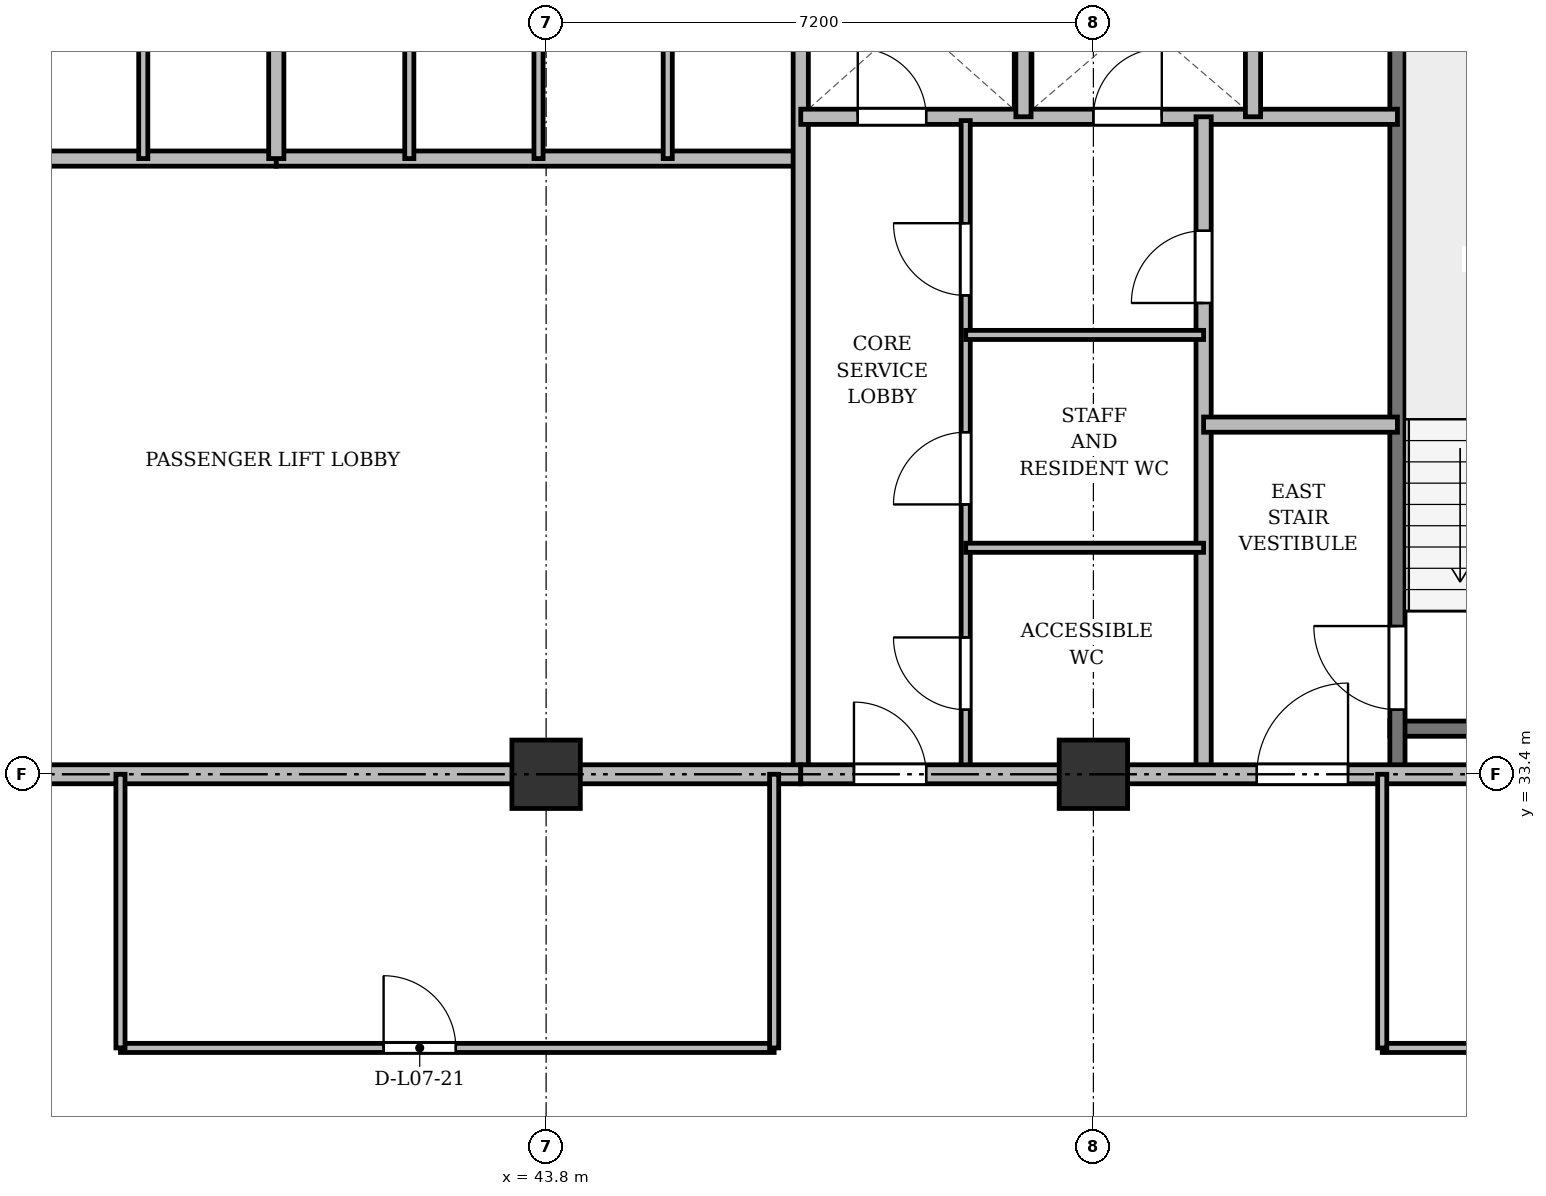
"""IFC4 building model, lengths in metres.
Left out: names, types, materials, properties, quantities, classifications, styles, units other than length and angle.
Written with IfcOpenShell. Run it as: python <this file> out.ifc"""

import sys

from ifc_helpers import new_model, si_unit, direction, frame, frame_2d, origin, origin_2d, place, context, subcontext, project, spatial, rectangle, extrude, source, transform, mapped, element, fill, save


model = new_model("IFC4")
c1 = context("Model", 3, precision=1e-05, world=origin(), true_north=direction((0.0, 1.0)))
c2 = subcontext(c1, "Body", "Model", "MODEL_VIEW")
j1 = project(units=[si_unit("LENGTHUNIT", "METRE"), si_unit("PLANEANGLEUNIT", "RADIAN")], contexts=[c1])
p1 = place(None, origin())
s1 = spatial("IfcSite", under=j1, at=p1, CompositionType="ELEMENT")
p2 = place(p1, origin())
s2 = spatial("IfcBuilding", under=s1, at=p2, CompositionType="ELEMENT")
p3 = place(p2, frame((0.0, 0.0, 30.7)))
s3 = spatial("IfcBuildingStorey", under=s2, at=p3, CompositionType="ELEMENT", Elevation=30.7)
m1 = source(origin(), c2, "Body", "SweptSolid", [
    extrude(rectangle(XDim=0.9, YDim=0.9, at=origin_2d()), origin(), (0.0, 0.0, 1.0), 3.6),
])
for number, where, z_axis, x_axis in (
    (1, (43.8, 33.4, 0.0), (0.0, 0.0, 1.0), (1.0, 0.0, 0.0)),
    (2, (51.0, 33.4, 0.0), (0.0, 0.0, 1.0), (1.0, 0.0, 0.0)),
):
    element("IfcColumn", number, at=place(p3, frame(where, z_axis=z_axis, x_axis=x_axis)), inside=s3, PredefinedType="COLUMN", context=c2, shape_type="MappedRepresentation", body=[
        mapped(m1, transform((0.0, 0.0, 0.0), x_axis=(1.0, 0.0, 0.0), y_axis=(0.0, 1.0, 0.0), z_axis=(0.0, 0.0, 1.0), scale=1.0)),
    ])
p4 = place(p3, frame((54.9, 34.0, 0.0), z_axis=(0.0, 0.0, 1.0), x_axis=(1.0, 0.0, 0.0)))
e3 = element("IfcWall", 3, at=p4, inside=s3, PredefinedType="SHEAR", context=c2, shape_type="SweptSolid", body=[
    extrude(rectangle(XDim=3.4, YDim=0.2, at=frame_2d((1.7, 0.0))), origin(), (0.0, 0.0, 1.0), 3.34),
])
p5 = place(p3, frame((55.0, 33.4, 0.0), z_axis=(0.0, 0.0, 1.0), x_axis=(0.0, 1.0, 0.0)))
e4 = element("IfcWall", 4, at=p5, inside=s3, PredefinedType="SHEAR", context=c2, shape_type="SweptSolid", body=[
    extrude(rectangle(XDim=11.1, YDim=0.2, at=frame_2d((5.55, 0.0))), origin(), (0.0, 0.0, 1.0), 3.34),
])
p6 = place(p5, frame((0.85, 0.0, 0.0)))
e5 = element("IfcOpeningElement", 5, at=p6, cuts=e4, PredefinedType="OPENING", context=c2, shape_type="SweptSolid", body=[
    extrude(rectangle(XDim=1.1, YDim=2.15, at=frame_2d((0.55, 1.075))), frame((0.0, 0.11, 0.0), z_axis=(0.0, -1.0, 0.0), x_axis=(1.0, 0.0, 0.0)), (0.0, 0.0, 1.0), 0.22),
])
p7 = place(p3, frame((33.35, 41.5, 0.0), z_axis=(0.0, 0.0, 1.0), x_axis=(1.0, 0.0, 0.0)))
e6 = element("IfcWall", 6, at=p7, inside=s3, PredefinedType="SOLIDWALL", context=c2, shape_type="SweptSolid", body=[
    extrude(rectangle(XDim=6.9, YDim=0.2, at=frame_2d((3.45, 0.0))), origin(), (0.0, 0.0, 1.0), 3.34),
])
p8 = place(p3, frame((38.5, 41.5, 0.0), z_axis=(0.0, 0.0, 1.0), x_axis=(0.0, 1.0, 0.0)))
e7 = element("IfcWall", 7, at=p8, inside=s3, PredefinedType="PARTITIONING", context=c2, shape_type="SweptSolid", body=[
    extrude(rectangle(XDim=3.2, YDim=0.12, at=frame_2d((1.6, 0.0))), origin(), (0.0, 0.0, 1.0), 3.34),
])
p9 = place(p3, frame((40.25, 41.5, 0.0), z_axis=(0.0, 0.0, 1.0), x_axis=(1.0, 0.0, 0.0)))
e8 = element("IfcWall", 8, at=p9, inside=s3, PredefinedType="SOLIDWALL", context=c2, shape_type="SweptSolid", body=[
    extrude(rectangle(XDim=6.9, YDim=0.2, at=frame_2d((3.45, 0.0))), origin(), (0.0, 0.0, 1.0), 2.752),
])
p10 = place(p3, frame((40.25, 41.5, 0.0), z_axis=(0.0, 0.0, 1.0), x_axis=(0.0, 1.0, 0.0)))
e9 = element("IfcWall", 9, at=p10, inside=s3, PredefinedType="SOLIDWALL", context=c2, shape_type="SweptSolid", body=[
    extrude(rectangle(XDim=3.2, YDim=0.2, at=frame_2d((1.6, 0.0))), origin(), (0.0, 0.0, 1.0), 3.34),
])
p11 = place(p3, frame((42.0, 41.5, 0.0), z_axis=(0.0, 0.0, 1.0), x_axis=(0.0, 1.0, 0.0)))
e10 = element("IfcWall", 10, at=p11, inside=s3, PredefinedType="PARTITIONING", context=c2, shape_type="SweptSolid", body=[
    extrude(rectangle(XDim=3.2, YDim=0.12, at=frame_2d((1.6, 0.0))), origin(), (0.0, 0.0, 1.0), 3.34),
])
p12 = place(p3, frame((43.7, 41.5, 0.0), z_axis=(0.0, 0.0, 1.0), x_axis=(0.0, 1.0, 0.0)))
e11 = element("IfcWall", 11, at=p12, inside=s3, PredefinedType="PARTITIONING", context=c2, shape_type="SweptSolid", body=[
    extrude(rectangle(XDim=3.2, YDim=0.12, at=frame_2d((1.6, 0.0))), origin(), (0.0, 0.0, 1.0), 2.752),
])
p13 = place(p3, frame((45.4, 41.5, 0.0), z_axis=(0.0, 0.0, 1.0), x_axis=(0.0, 1.0, 0.0)))
e12 = element("IfcWall", 12, at=p13, inside=s3, PredefinedType="PARTITIONING", context=c2, shape_type="SweptSolid", body=[
    extrude(rectangle(XDim=3.2, YDim=0.12, at=frame_2d((1.6, 0.0))), origin(), (0.0, 0.0, 1.0), 3.34),
])
p14 = place(p3, frame((47.15, 33.4, 0.0), z_axis=(0.0, 0.0, 1.0), x_axis=(0.0, 1.0, 0.0)))
e13 = element("IfcWall", 13, at=p14, inside=s3, PredefinedType="SOLIDWALL", context=c2, shape_type="SweptSolid", body=[
    extrude(rectangle(XDim=11.3, YDim=0.2, at=frame_2d((5.65, 0.0))), origin(), (0.0, 0.0, 1.0), 2.69),
])
p15 = place(p3, frame((26.3, 33.4, 0.0), z_axis=(0.0, 0.0, 1.0), x_axis=(1.0, 0.0, 0.0)))
e14 = element("IfcWall", 14, at=p15, inside=s3, PredefinedType="PARTITIONING", context=c2, shape_type="SweptSolid", body=[
    extrude(rectangle(XDim=20.85, YDim=0.25, at=frame_2d((10.425, 0.0))), origin(), (0.0, 0.0, 1.0), 2.69),
])
p16 = place(p15, frame((9.2, 0.0, 0.0)))
e15 = element("IfcOpeningElement", 15, at=p16, cuts=e14, PredefinedType="OPENING", context=c2, shape_type="SweptSolid", body=[
    extrude(rectangle(XDim=1.6, YDim=2.2, at=frame_2d((0.8, 1.1))), frame((0.0, 0.135, 0.0), z_axis=(0.0, -1.0, 0.0), x_axis=(1.0, 0.0, 0.0)), (0.0, 0.0, 1.0), 0.27),
])
p17 = place(p3, frame((47.15, 42.05, 0.0), z_axis=(0.0, 0.0, 1.0), x_axis=(1.0, 0.0, 0.0)))
e16 = element("IfcWall", 16, at=p17, inside=s3, PredefinedType="SOLIDWALL", context=c2, shape_type="SweptSolid", body=[
    extrude(rectangle(XDim=7.85, YDim=0.2, at=frame_2d((3.925, 0.0))), origin(), (0.0, 0.0, 1.0), 2.752),
])
p18 = place(p17, frame((0.75, 0.0, 0.0)))
e17 = element("IfcOpeningElement", 17, at=p18, cuts=e16, PredefinedType="OPENING", context=c2, shape_type="SweptSolid", body=[
    extrude(rectangle(XDim=0.9, YDim=2.1, at=frame_2d((0.45, 1.05))), frame((0.0, 0.11, 0.0), z_axis=(0.0, -1.0, 0.0), x_axis=(1.0, 0.0, 0.0)), (0.0, 0.0, 1.0), 0.22),
])
p19 = place(p17, frame((3.85, 0.0, 0.0)))
e18 = element("IfcOpeningElement", 18, at=p19, cuts=e16, PredefinedType="OPENING", context=c2, shape_type="SweptSolid", body=[
    extrude(rectangle(XDim=0.9, YDim=2.1, at=frame_2d((0.45, 1.05))), frame((0.0, 0.11, 0.0), z_axis=(0.0, -1.0, 0.0), x_axis=(1.0, 0.0, 0.0)), (0.0, 0.0, 1.0), 0.22),
])
for number, where, z_axis, x_axis in (
    (19, (50.08, 42.05, 0.0), (0.0, 0.0, 1.0), (0.0, 1.0, 0.0)),
    (20, (53.1, 42.05, 0.0), (0.0, 0.0, 1.0), (0.0, 1.0, 0.0)),
):
    element("IfcWall", number, at=place(p3, frame(where, z_axis=z_axis, x_axis=x_axis)), inside=s3, PredefinedType="SOLIDWALL", context=c2, shape_type="SweptSolid", body=[
        extrude(rectangle(XDim=2.65, YDim=0.2, at=frame_2d((1.325, 0.0))), origin(), (0.0, 0.0, 1.0), 3.34),
    ])
p20 = place(p3, frame((52.45, 33.4, 0.0), z_axis=(0.0, 0.0, 1.0), x_axis=(0.0, 1.0, 0.0)))
e21 = element("IfcWall", 21, at=p20, inside=s3, PredefinedType="PARTITIONING", context=c2, shape_type="SweptSolid", body=[
    extrude(rectangle(XDim=8.65, YDim=0.2, at=frame_2d((4.325, 0.0))), origin(), (0.0, 0.0, 1.0), 2.69),
])
p21 = place(p20, frame((6.2, 0.0, 0.0)))
e22 = element("IfcOpeningElement", 22, at=p21, cuts=e21, PredefinedType="OPENING", context=c2, shape_type="SweptSolid", body=[
    extrude(rectangle(XDim=0.95, YDim=2.15, at=frame_2d((0.475, 1.075))), frame((0.0, 0.11, 0.0), z_axis=(0.0, -1.0, 0.0), x_axis=(1.0, 0.0, 0.0)), (0.0, 0.0, 1.0), 0.22),
])
p22 = place(p3, frame((52.45, 38.0, 0.0), z_axis=(0.0, 0.0, 1.0), x_axis=(1.0, 0.0, 0.0)))
e23 = element("IfcWall", 23, at=p22, inside=s3, PredefinedType="PARTITIONING", context=c2, shape_type="SweptSolid", body=[
    extrude(rectangle(XDim=2.55, YDim=0.2, at=frame_2d((1.275, 0.0))), origin(), (0.0, 0.0, 1.0), 3.34),
])
p23 = place(p3, frame((49.32, 33.4, 0.0), z_axis=(0.0, 0.0, 1.0), x_axis=(0.0, 1.0, 0.0)))
e24 = element("IfcWall", 24, at=p23, inside=s3, PredefinedType="PARTITIONING", context=c2, shape_type="SweptSolid", body=[
    extrude(rectangle(XDim=8.6, YDim=0.12, at=frame_2d((4.3, 0.0))), origin(), (0.0, 0.0, 1.0), 2.69),
])
p24 = place(p23, frame((0.85, 0.0, 0.0)))
e25 = element("IfcOpeningElement", 25, at=p24, cuts=e24, PredefinedType="OPENING", context=c2, shape_type="SweptSolid", body=[
    extrude(rectangle(XDim=0.95, YDim=2.15, at=frame_2d((0.475, 1.075))), frame((0.0, 0.07, 0.0), z_axis=(0.0, -1.0, 0.0), x_axis=(1.0, 0.0, 0.0)), (0.0, 0.0, 1.0), 0.14),
])
p25 = place(p23, frame((3.55, 0.0, 0.0)))
e26 = element("IfcOpeningElement", 26, at=p25, cuts=e24, PredefinedType="OPENING", context=c2, shape_type="SweptSolid", body=[
    extrude(rectangle(XDim=0.95, YDim=2.15, at=frame_2d((0.475, 1.075))), frame((0.0, 0.07, 0.0), z_axis=(0.0, -1.0, 0.0), x_axis=(1.0, 0.0, 0.0)), (0.0, 0.0, 1.0), 0.14),
])
p26 = place(p23, frame((6.3, 0.0, 0.0)))
e27 = element("IfcOpeningElement", 27, at=p26, cuts=e24, PredefinedType="OPENING", context=c2, shape_type="SweptSolid", body=[
    extrude(rectangle(XDim=0.95, YDim=2.15, at=frame_2d((0.475, 1.075))), frame((0.0, 0.07, 0.0), z_axis=(0.0, -1.0, 0.0), x_axis=(1.0, 0.0, 0.0)), (0.0, 0.0, 1.0), 0.14),
])
for number, where, z_axis, x_axis in (
    (28, (49.32, 36.38, 0.0), (0.0, 0.0, 1.0), (1.0, 0.0, 0.0)),
    (29, (49.32, 39.18, 0.0), (0.0, 0.0, 1.0), (1.0, 0.0, 0.0)),
):
    element("IfcWall", number, at=place(p3, frame(where, z_axis=z_axis, x_axis=x_axis)), inside=s3, PredefinedType="PARTITIONING", context=c2, shape_type="SweptSolid", body=[
        extrude(rectangle(XDim=3.13, YDim=0.12, at=frame_2d((1.565, 0.0))), origin(), (0.0, 0.0, 1.0), 2.752),
    ])
p27 = place(p3, frame((47.15, 33.4, 0.0), z_axis=(0.0, 0.0, 1.0), x_axis=(1.0, 0.0, 0.0)))
e30 = element("IfcWall", 30, at=p27, inside=s3, PredefinedType="PARTITIONING", context=c2, shape_type="SweptSolid", body=[
    extrude(rectangle(XDim=11.15, YDim=0.25, at=frame_2d((5.575, 0.0))), origin(), (0.0, 0.0, 1.0), 2.69),
])
p28 = place(p27, frame((0.7, 0.0, 0.0)))
e31 = element("IfcOpeningElement", 31, at=p28, cuts=e30, PredefinedType="OPENING", context=c2, shape_type="SweptSolid", body=[
    extrude(rectangle(XDim=0.95, YDim=2.15, at=frame_2d((0.475, 1.075))), frame((0.0, 0.135, 0.0), z_axis=(0.0, -1.0, 0.0), x_axis=(1.0, 0.0, 0.0)), (0.0, 0.0, 1.0), 0.27),
])
p29 = place(p27, frame((6.0, 0.0, 0.0)))
e32 = element("IfcOpeningElement", 32, at=p29, cuts=e30, PredefinedType="OPENING", context=c2, shape_type="SweptSolid", body=[
    extrude(rectangle(XDim=1.2, YDim=2.15, at=frame_2d((0.6, 1.075))), frame((0.0, 0.135, 0.0), z_axis=(0.0, -1.0, 0.0), x_axis=(1.0, 0.0, 0.0)), (0.0, 0.0, 1.0), 0.27),
])
p30 = place(p3, frame((38.2, 29.8, 0.0), z_axis=(0.0, 0.0, 1.0), x_axis=(1.0, 0.0, 0.0)))
e33 = element("IfcWall", 33, at=p30, inside=s3, PredefinedType="PARTITIONING", context=c2, shape_type="SweptSolid", body=[
    extrude(rectangle(XDim=8.6, YDim=0.12, at=frame_2d((4.3, 0.0))), origin(), (0.0, 0.0, 1.0), 2.752),
])
p31 = place(p30, frame((3.462, 0.0, 0.0)))
e34 = element("IfcOpeningElement", 34, at=p31, cuts=e33, PredefinedType="OPENING", context=c2, shape_type="SweptSolid", body=[
    extrude(rectangle(XDim=0.95, YDim=2.15, at=frame_2d((0.475, 1.075))), frame((0.0, 0.07, 0.0), z_axis=(0.0, -1.0, 0.0), x_axis=(1.0, 0.0, 0.0)), (0.0, 0.0, 1.0), 0.14),
])
p32 = place(p3, frame((54.8, 29.8, 0.0), z_axis=(0.0, 0.0, 1.0), x_axis=(1.0, 0.0, 0.0)))
e35 = element("IfcWall", 35, at=p32, inside=s3, PredefinedType="PARTITIONING", context=c2, shape_type="SweptSolid", body=[
    extrude(rectangle(XDim=14.85, YDim=0.12, at=frame_2d((7.425, 0.0))), origin(), (0.0, 0.0, 1.0), 2.752),
])
p33 = place(p32, frame((2.5, 0.0, 0.0)))
e36 = element("IfcOpeningElement", 36, at=p33, cuts=e35, PredefinedType="OPENING", context=c2, shape_type="SweptSolid", body=[
    extrude(rectangle(XDim=0.95, YDim=2.15, at=frame_2d((0.475, 1.075))), frame((0.0, 0.07, 0.0), z_axis=(0.0, -1.0, 0.0), x_axis=(1.0, 0.0, 0.0)), (0.0, 0.0, 1.0), 0.14),
])
p34 = place(p32, frame((9.2, 0.0, 0.0)))
e37 = element("IfcOpeningElement", 37, at=p34, cuts=e35, PredefinedType="OPENING", context=c2, shape_type="SweptSolid", body=[
    extrude(rectangle(XDim=0.95, YDim=2.15, at=frame_2d((0.475, 1.075))), frame((0.0, 0.07, 0.0), z_axis=(0.0, -1.0, 0.0), x_axis=(1.0, 0.0, 0.0)), (0.0, 0.0, 1.0), 0.14),
])
for number, where, z_axis, x_axis in (
    (38, (38.2, 29.8, 0.0), (0.0, 0.0, 1.0), (0.0, 1.0, 0.0)),
    (39, (46.8, 29.8, 0.0), (0.0, 0.0, 1.0), (0.0, 1.0, 0.0)),
    (40, (54.8, 29.8, 0.0), (0.0, 0.0, 1.0), (0.0, 1.0, 0.0)),
):
    element("IfcWall", number, at=place(p3, frame(where, z_axis=z_axis, x_axis=x_axis)), inside=s3, PredefinedType="PARTITIONING", context=c2, shape_type="SweptSolid", body=[
        extrude(rectangle(XDim=3.6, YDim=0.12, at=frame_2d((1.8, 0.0))), origin(), (0.0, 0.0, 1.0), 2.69),
    ])
m2 = source(origin(), c2, "Body", "SweptSolid", [
    extrude(rectangle(XDim=1.1, YDim=2.15, at=frame_2d((0.55, 1.075))), frame((0.0, 0.025, 0.0), z_axis=(0.0, -1.0, 0.0), x_axis=(1.0, 0.0, 0.0)), (0.0, 0.0, 1.0), 0.05),
])
p35 = place(p6, origin())
e41 = element("IfcDoor", 41, at=p35, inside=s3, OperationType="SINGLE_SWING_RIGHT", PredefinedType="DOOR", context=c2, shape_type="MappedRepresentation", body=[
    mapped(m2, transform((0.0, 0.0, 0.0), x_axis=(1.0, 0.0, 0.0), y_axis=(0.0, 1.0, 0.0), z_axis=(0.0, 0.0, 1.0), scale=1.0)),
])
fill(e5, e41)
m3 = source(origin(), c2, "Body", "SweptSolid", [
    extrude(rectangle(XDim=0.9, YDim=2.1, at=frame_2d((0.45, 1.05))), frame((0.0, 0.025, 0.0), z_axis=(0.0, -1.0, 0.0), x_axis=(1.0, 0.0, 0.0)), (0.0, 0.0, 1.0), 0.05),
])
p36 = place(p18, origin())
e42 = element("IfcDoor", 42, at=p36, inside=s3, OperationType="SINGLE_SWING_LEFT", PredefinedType="DOOR", context=c2, shape_type="MappedRepresentation", body=[
    mapped(m3, transform((0.0, 0.0, 0.0), x_axis=(1.0, 0.0, 0.0), y_axis=(0.0, 1.0, 0.0), z_axis=(0.0, 0.0, 1.0), scale=1.0)),
])
fill(e17, e42)
p37 = place(p19, origin())
e43 = element("IfcDoor", 43, at=p37, inside=s3, OperationType="SINGLE_SWING_RIGHT", PredefinedType="DOOR", context=c2, shape_type="MappedRepresentation", body=[
    mapped(m3, transform((0.0, 0.0, 0.0), x_axis=(1.0, 0.0, 0.0), y_axis=(0.0, 1.0, 0.0), z_axis=(0.0, 0.0, 1.0), scale=1.0)),
])
fill(e18, e43)
m4 = source(origin(), c2, "Body", "SweptSolid", [
    extrude(rectangle(XDim=0.95, YDim=2.15, at=frame_2d((0.475, 1.075))), frame((0.0, 0.025, 0.0), z_axis=(0.0, -1.0, 0.0), x_axis=(1.0, 0.0, 0.0)), (0.0, 0.0, 1.0), 0.05),
])
p38 = place(p21, origin())
e44 = element("IfcDoor", 44, at=p38, inside=s3, OperationType="SINGLE_SWING_LEFT", PredefinedType="DOOR", context=c2, shape_type="MappedRepresentation", body=[
    mapped(m4, transform((0.0, 0.0, 0.0), x_axis=(1.0, 0.0, 0.0), y_axis=(0.0, 1.0, 0.0), z_axis=(0.0, 0.0, 1.0), scale=1.0)),
])
fill(e22, e44)
p39 = place(p24, origin())
e45 = element("IfcDoor", 45, at=p39, inside=s3, OperationType="SINGLE_SWING_RIGHT", PredefinedType="DOOR", context=c2, shape_type="MappedRepresentation", body=[
    mapped(m4, transform((0.0, 0.0, 0.0), x_axis=(1.0, 0.0, 0.0), y_axis=(0.0, 1.0, 0.0), z_axis=(0.0, 0.0, 1.0), scale=1.0)),
])
fill(e25, e45)
p40 = place(p25, origin())
e46 = element("IfcDoor", 46, at=p40, inside=s3, OperationType="SINGLE_SWING_LEFT", PredefinedType="DOOR", context=c2, shape_type="MappedRepresentation", body=[
    mapped(m4, transform((0.0, 0.0, 0.0), x_axis=(1.0, 0.0, 0.0), y_axis=(0.0, 1.0, 0.0), z_axis=(0.0, 0.0, 1.0), scale=1.0)),
])
fill(e26, e46)
p41 = place(p26, origin())
e47 = element("IfcDoor", 47, at=p41, inside=s3, OperationType="SINGLE_SWING_RIGHT", PredefinedType="DOOR", context=c2, shape_type="MappedRepresentation", body=[
    mapped(m4, transform((0.0, 0.0, 0.0), x_axis=(1.0, 0.0, 0.0), y_axis=(0.0, 1.0, 0.0), z_axis=(0.0, 0.0, 1.0), scale=1.0)),
])
fill(e27, e47)
p42 = place(p28, origin())
e48 = element("IfcDoor", 48, at=p42, inside=s3, OperationType="SINGLE_SWING_LEFT", PredefinedType="DOOR", context=c2, shape_type="MappedRepresentation", body=[
    mapped(m4, transform((0.0, 0.0, 0.0), x_axis=(1.0, 0.0, 0.0), y_axis=(0.0, 1.0, 0.0), z_axis=(0.0, 0.0, 1.0), scale=1.0)),
])
fill(e31, e48)
m5 = source(origin(), c2, "Body", "SweptSolid", [
    extrude(rectangle(XDim=1.2, YDim=2.15, at=frame_2d((0.6, 1.075))), frame((0.0, 0.025, 0.0), z_axis=(0.0, -1.0, 0.0), x_axis=(1.0, 0.0, 0.0)), (0.0, 0.0, 1.0), 0.05),
])
p43 = place(p29, origin())
e49 = element("IfcDoor", 49, at=p43, inside=s3, OperationType="SINGLE_SWING_RIGHT", PredefinedType="DOOR", context=c2, shape_type="MappedRepresentation", body=[
    mapped(m5, transform((0.0, 0.0, 0.0), x_axis=(1.0, 0.0, 0.0), y_axis=(0.0, 1.0, 0.0), z_axis=(0.0, 0.0, 1.0), scale=1.0)),
])
fill(e32, e49)
p44 = place(p31, origin())
e50 = element("IfcDoor", 50, at=p44, inside=s3, OperationType="SINGLE_SWING_LEFT", PredefinedType="DOOR", context=c2, shape_type="MappedRepresentation", body=[
    mapped(m4, transform((0.0, 0.0, 0.0), x_axis=(1.0, 0.0, 0.0), y_axis=(0.0, 1.0, 0.0), z_axis=(0.0, 0.0, 1.0), scale=1.0)),
])
fill(e34, e50)
save(model, sys.argv[1])
